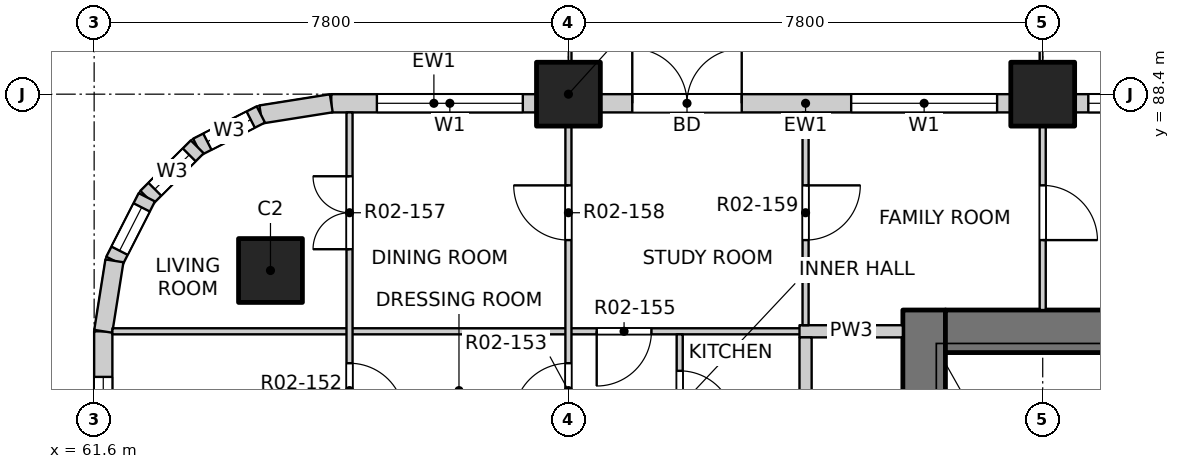
"""IFC4 building model, lengths in metres.
Left out: names, types, materials, properties, quantities, classifications, styles, units other than length and angle.
Written with IfcOpenShell. Run it as: python <this file> out.ifc"""

import sys

from ifc_helpers import new_model, si_unit, direction, frame, frame_2d, origin, origin_2d, place, context, subcontext, project, spatial, rectangle, extrude, element, fill, save


model = new_model("IFC4")
c1 = context("Model", 3, precision=1e-05, world=origin(), true_north=direction((0.0, 1.0)))
c2 = subcontext(c1, "Body", "Model", "MODEL_VIEW")
j1 = project(units=[si_unit("LENGTHUNIT", "METRE"), si_unit("PLANEANGLEUNIT", "RADIAN")], contexts=[c1])
p1 = place(None, origin())
s1 = spatial("IfcSite", under=j1, at=p1, CompositionType="ELEMENT")
p2 = place(p1, origin())
s2 = spatial("IfcBuilding", under=s1, at=p2, CompositionType="ELEMENT")
p3 = place(p2, frame((0.0, 0.0, 29.7)))
s3 = spatial("IfcBuildingStorey", under=s2, at=p3, CompositionType="ELEMENT", Elevation=29.7)
for number, where, z_axis, x_axis in (
    (1, (64.5, 85.5, -0.25), (0.0, 0.0, 1.0), (1.0, 0.0, 0.0)),
    (2, (69.4, 88.4, -0.25), (0.0, 0.0, 1.0), (1.0, 0.0, 0.0)),
    (3, (77.2, 88.4, -0.25), (0.0, 0.0, 1.0), (1.0, 0.0, 0.0)),
):
    element("IfcColumn", number, at=place(p3, frame(where, z_axis=z_axis, x_axis=x_axis)), inside=s3, PredefinedType="COLUMN", context=c2, shape_type="SweptSolid", body=[
        extrude(rectangle(XDim=1.05, YDim=1.05, at=origin_2d()), origin(), (0.0, 0.0, 1.0), 3.4),
    ])
p4 = place(p3, frame((75.25, 77.3, -0.25), z_axis=(0.0, 0.0, 1.0), x_axis=(0.0, 1.0, 0.0)))
e4 = element("IfcWall", 4, at=p4, inside=s3, PredefinedType="SOLIDWALL", context=c2, shape_type="SweptSolid", body=[
    extrude(rectangle(XDim=7.55, YDim=0.7, at=frame_2d((3.775, 0.0))), origin(), (0.0, 0.0, 1.0), 3.4),
])
p5 = place(p4, frame((0.3, 0.0, 0.25)))
e5 = element("IfcOpeningElement", 5, at=p5, cuts=e4, PredefinedType="OPENING", context=c2, shape_type="SweptSolid", body=[
    extrude(rectangle(XDim=1.2, YDim=2.1, at=frame_2d((0.6, 1.05))), frame((0.0, 0.36, 0.0), z_axis=(0.0, -1.0, 0.0), x_axis=(1.0, 0.0, 0.0)), (0.0, 0.0, 1.0), 0.72),
])
p6 = place(p3, frame((75.6, 84.5, -0.25), z_axis=(0.0, 0.0, 1.0), x_axis=(1.0, 0.0, 0.0)))
e6 = element("IfcWall", 6, at=p6, inside=s3, PredefinedType="SOLIDWALL", context=c2, shape_type="SweptSolid", body=[
    extrude(rectangle(XDim=18.8, YDim=0.7, at=frame_2d((9.4, 0.0))), origin(), (0.0, 0.0, 1.0), 3.4),
])
p7 = place(p3, frame((65.5, 88.25, 0.0), z_axis=(0.0, 0.0, 1.0), x_axis=(1.0, 0.0, 0.0)))
e7 = element("IfcWall", 7, at=p7, inside=s3, PredefinedType="SOLIDWALL", context=c2, shape_type="SweptSolid", body=[
    extrude(rectangle(XDim=3.375, YDim=0.3, at=frame_2d((1.688, 0.0))), origin(), (0.0, 0.0, 1.0), 2.7),
])
p8 = place(p7, frame((0.75, 0.0, 0.9)))
e8 = element("IfcOpeningElement", 8, at=p8, cuts=e7, PredefinedType="OPENING", context=c2, shape_type="SweptSolid", body=[
    extrude(rectangle(XDim=2.4, YDim=1.8, at=frame_2d((1.2, 0.9))), frame((0.0, 0.16, 0.0), z_axis=(0.0, -1.0, 0.0), x_axis=(1.0, 0.0, 0.0)), (0.0, 0.0, 1.0), 0.32),
])
p9 = place(p3, frame((69.925, 88.25, 0.0), z_axis=(0.0, 0.0, 1.0), x_axis=(1.0, 0.0, 0.0)))
e9 = element("IfcWall", 9, at=p9, inside=s3, PredefinedType="SOLIDWALL", context=c2, shape_type="SweptSolid", body=[
    extrude(rectangle(XDim=6.75, YDim=0.3, at=frame_2d((3.375, 0.0))), origin(), (0.0, 0.0, 1.0), 2.7),
])
p10 = place(p9, frame((0.525, 0.0, 0.0)))
e10 = element("IfcOpeningElement", 10, at=p10, cuts=e9, PredefinedType="OPENING", context=c2, shape_type="SweptSolid", body=[
    extrude(rectangle(XDim=1.8, YDim=2.4, at=frame_2d((0.9, 1.2))), frame((0.0, 0.16, 0.0), z_axis=(0.0, -1.0, 0.0), x_axis=(1.0, 0.0, 0.0)), (0.0, 0.0, 1.0), 0.32),
])
p11 = place(p9, frame((4.125, 0.0, 0.9)))
e11 = element("IfcOpeningElement", 11, at=p11, cuts=e9, PredefinedType="OPENING", context=c2, shape_type="SweptSolid", body=[
    extrude(rectangle(XDim=2.4, YDim=1.8, at=frame_2d((1.2, 0.9))), frame((0.0, 0.16, 0.0), z_axis=(0.0, -1.0, 0.0), x_axis=(1.0, 0.0, 0.0)), (0.0, 0.0, 1.0), 0.32),
])
p12 = place(p3, frame((77.725, 88.25, 0.0), z_axis=(0.0, 0.0, 1.0), x_axis=(1.0, 0.0, 0.0)))
e12 = element("IfcWall", 12, at=p12, inside=s3, PredefinedType="SOLIDWALL", context=c2, shape_type="SweptSolid", body=[
    extrude(rectangle(XDim=6.75, YDim=0.3, at=frame_2d((3.375, 0.0))), origin(), (0.0, 0.0, 1.0), 2.7),
])
p13 = place(p12, frame((0.225, 0.0, 0.9)))
e13 = element("IfcOpeningElement", 13, at=p13, cuts=e12, PredefinedType="OPENING", context=c2, shape_type="SweptSolid", body=[
    extrude(rectangle(XDim=2.4, YDim=1.8, at=frame_2d((1.2, 0.9))), frame((0.0, 0.16, 0.0), z_axis=(0.0, -1.0, 0.0), x_axis=(1.0, 0.0, 0.0)), (0.0, 0.0, 1.0), 0.32),
])
p14 = place(p12, frame((4.125, 0.0, 0.9)))
e14 = element("IfcOpeningElement", 14, at=p14, cuts=e12, PredefinedType="OPENING", context=c2, shape_type="SweptSolid", body=[
    extrude(rectangle(XDim=2.4, YDim=1.8, at=frame_2d((1.2, 0.9))), frame((0.0, 0.16, 0.0), z_axis=(0.0, -1.0, 0.0), x_axis=(1.0, 0.0, 0.0)), (0.0, 0.0, 1.0), 0.32),
])
p15 = place(p3, frame((61.75, 81.125, 0.0), z_axis=(0.0, 0.0, 1.0), x_axis=(0.0, 1.0, 0.0)))
e15 = element("IfcWall", 15, at=p15, inside=s3, PredefinedType="SOLIDWALL", context=c2, shape_type="SweptSolid", body=[
    extrude(rectangle(XDim=3.375, YDim=0.3, at=frame_2d((1.688, 0.0))), origin(), (0.0, 0.0, 1.0), 2.7),
])
p16 = place(p15, frame((0.225, 0.0, 0.9)))
e16 = element("IfcOpeningElement", 16, at=p16, cuts=e15, PredefinedType="OPENING", context=c2, shape_type="SweptSolid", body=[
    extrude(rectangle(XDim=2.4, YDim=1.8, at=frame_2d((1.2, 0.9))), frame((0.0, 0.16, 0.0), z_axis=(0.0, -1.0, 0.0), x_axis=(1.0, 0.0, 0.0)), (0.0, 0.0, 1.0), 0.32),
])
p17 = place(p3, frame((65.5, 88.25, 0.0), z_axis=(0.0, 0.0, 1.0), x_axis=(-0.987678452879, -0.156496880861, 0.0)))
e17 = element("IfcWall", 17, at=p17, inside=s3, PredefinedType="SOLIDWALL", context=c2, shape_type="SweptSolid", body=[
    extrude(rectangle(XDim=1.173, YDim=0.3, at=frame_2d((0.586, 0.0))), origin(), (0.0, 0.0, 1.0), 2.7),
])
p18 = place(p3, frame((64.341, 88.066, 0.0), z_axis=(0.0, 0.0, 1.0), x_axis=(-0.890988677504, -0.454025524128, 0.0)))
e18 = element("IfcWall", 18, at=p18, inside=s3, PredefinedType="SOLIDWALL", context=c2, shape_type="SweptSolid", body=[
    extrude(rectangle(XDim=1.173, YDim=0.3, at=frame_2d((0.587, 0.0))), origin(), (0.0, 0.0, 1.0), 2.7),
])
p19 = place(p18, frame((0.187, 0.0, 0.9)))
e19 = element("IfcOpeningElement", 19, at=p19, cuts=e18, PredefinedType="OPENING", context=c2, shape_type="SweptSolid", body=[
    extrude(rectangle(XDim=0.8, YDim=1.2, at=frame_2d((0.4, 0.6))), frame((0.0, 0.16, 0.0), z_axis=(0.0, -1.0, 0.0), x_axis=(1.0, 0.0, 0.0)), (0.0, 0.0, 1.0), 0.32),
])
p20 = place(p3, frame((63.296, 87.534, 0.0), z_axis=(0.0, 0.0, 1.0), x_axis=(-0.707106781187, -0.707106781187, 0.0)))
e20 = element("IfcWall", 20, at=p20, inside=s3, PredefinedType="SOLIDWALL", context=c2, shape_type="SweptSolid", body=[
    extrude(rectangle(XDim=1.173, YDim=0.3, at=frame_2d((0.586, 0.0))), origin(), (0.0, 0.0, 1.0), 2.7),
])
p21 = place(p20, frame((0.187, 0.0, 0.9)))
e21 = element("IfcOpeningElement", 21, at=p21, cuts=e20, PredefinedType="OPENING", context=c2, shape_type="SweptSolid", body=[
    extrude(rectangle(XDim=0.8, YDim=1.2, at=frame_2d((0.4, 0.6))), frame((0.0, 0.16, 0.0), z_axis=(0.0, -1.0, 0.0), x_axis=(1.0, 0.0, 0.0)), (0.0, 0.0, 1.0), 0.32),
])
p22 = place(p3, frame((62.466, 86.704, 0.0), z_axis=(0.0, 0.0, 1.0), x_axis=(-0.454025524128, -0.890988677504, 0.0)))
e22 = element("IfcWall", 22, at=p22, inside=s3, PredefinedType="SOLIDWALL", context=c2, shape_type="SweptSolid", body=[
    extrude(rectangle(XDim=1.173, YDim=0.3, at=frame_2d((0.587, 0.0))), origin(), (0.0, 0.0, 1.0), 2.7),
])
p23 = place(p22, frame((0.187, 0.0, 0.9)))
e23 = element("IfcOpeningElement", 23, at=p23, cuts=e22, PredefinedType="OPENING", context=c2, shape_type="SweptSolid", body=[
    extrude(rectangle(XDim=0.8, YDim=1.2, at=frame_2d((0.4, 0.6))), frame((0.0, 0.16, 0.0), z_axis=(0.0, -1.0, 0.0), x_axis=(1.0, 0.0, 0.0)), (0.0, 0.0, 1.0), 0.32),
])
p24 = place(p3, frame((61.934, 85.659, 0.0), z_axis=(0.0, 0.0, 1.0), x_axis=(-0.156496880861, -0.987678452879, 0.0)))
e24 = element("IfcWall", 24, at=p24, inside=s3, PredefinedType="SOLIDWALL", context=c2, shape_type="SweptSolid", body=[
    extrude(rectangle(XDim=1.173, YDim=0.3, at=frame_2d((0.586, 0.0))), origin(), (0.0, 0.0, 1.0), 2.7),
])
p25 = place(p3, frame((61.9, 84.5, 0.0), z_axis=(0.0, 0.0, 1.0), x_axis=(1.0, 0.0, 0.0)))
e25 = element("IfcWall", 25, at=p25, inside=s3, PredefinedType="PARTITIONING", context=c2, shape_type="SweptSolid", body=[
    extrude(rectangle(XDim=11.5, YDim=0.1, at=frame_2d((5.75, 0.0))), origin(), (0.0, 0.0, 1.0), 3.15),
])
p26 = place(p25, frame((7.965, 0.0, 0.0)))
e26 = element("IfcOpeningElement", 26, at=p26, cuts=e25, PredefinedType="OPENING", context=c2, shape_type="SweptSolid", body=[
    extrude(rectangle(XDim=0.9, YDim=2.1, at=frame_2d((0.45, 1.05))), frame((0.0, 0.06, 0.0), z_axis=(0.0, -1.0, 0.0), x_axis=(1.0, 0.0, 0.0)), (0.0, 0.0, 1.0), 0.12),
])
p27 = place(p3, frame((73.2, 84.5, 0.0), z_axis=(0.0, 0.0, 1.0), x_axis=(1.0, 0.0, 0.0)))
e27 = element("IfcWall", 27, at=p27, inside=s3, PredefinedType="PARTITIONING", context=c2, shape_type="SweptSolid", body=[
    extrude(rectangle(XDim=1.7, YDim=0.2, at=frame_2d((0.85, 0.0))), origin(), (0.0, 0.0, 1.0), 3.15),
])
p28 = place(p3, frame((65.8, 76.8, 0.0), z_axis=(0.0, 0.0, 1.0), x_axis=(0.0, 1.0, 0.0)))
e28 = element("IfcWall", 28, at=p28, inside=s3, PredefinedType="PARTITIONING", context=c2, shape_type="SweptSolid", body=[
    extrude(rectangle(XDim=11.3, YDim=0.1, at=frame_2d((5.65, 0.0))), origin(), (0.0, 0.0, 1.0), 3.15),
])
p29 = place(p28, frame((0.425, 0.0, 0.0)))
e29 = element("IfcOpeningElement", 29, at=p29, cuts=e28, PredefinedType="OPENING", context=c2, shape_type="SweptSolid", body=[
    extrude(rectangle(XDim=0.9, YDim=2.1, at=frame_2d((0.45, 1.05))), frame((0.0, 0.06, 0.0), z_axis=(0.0, -1.0, 0.0), x_axis=(1.0, 0.0, 0.0)), (0.0, 0.0, 1.0), 0.12),
])
p30 = place(p28, frame((2.375, 0.0, 0.0)))
e30 = element("IfcOpeningElement", 30, at=p30, cuts=e28, PredefinedType="OPENING", context=c2, shape_type="SweptSolid", body=[
    extrude(rectangle(XDim=0.9, YDim=2.1, at=frame_2d((0.45, 1.05))), frame((0.0, 0.06, 0.0), z_axis=(0.0, -1.0, 0.0), x_axis=(1.0, 0.0, 0.0)), (0.0, 0.0, 1.0), 0.12),
])
p31 = place(p28, frame((4.325, 0.0, 0.0)))
e31 = element("IfcOpeningElement", 31, at=p31, cuts=e28, PredefinedType="OPENING", context=c2, shape_type="SweptSolid", body=[
    extrude(rectangle(XDim=0.9, YDim=2.1, at=frame_2d((0.45, 1.05))), frame((0.0, 0.06, 0.0), z_axis=(0.0, -1.0, 0.0), x_axis=(1.0, 0.0, 0.0)), (0.0, 0.0, 1.0), 0.12),
])
p32 = place(p28, frame((6.275, 0.0, 0.0)))
e32 = element("IfcOpeningElement", 32, at=p32, cuts=e28, PredefinedType="OPENING", context=c2, shape_type="SweptSolid", body=[
    extrude(rectangle(XDim=0.9, YDim=2.1, at=frame_2d((0.45, 1.05))), frame((0.0, 0.06, 0.0), z_axis=(0.0, -1.0, 0.0), x_axis=(1.0, 0.0, 0.0)), (0.0, 0.0, 1.0), 0.12),
])
p33 = place(p28, frame((9.05, 0.0, 0.0)))
e33 = element("IfcOpeningElement", 33, at=p33, cuts=e28, PredefinedType="OPENING", context=c2, shape_type="SweptSolid", body=[
    extrude(rectangle(XDim=1.2, YDim=2.1, at=frame_2d((0.6, 1.05))), frame((0.0, 0.06, 0.0), z_axis=(0.0, -1.0, 0.0), x_axis=(1.0, 0.0, 0.0)), (0.0, 0.0, 1.0), 0.12),
])
p34 = place(p3, frame((69.4, 80.6, 0.0), z_axis=(0.0, 0.0, 1.0), x_axis=(0.0, 1.0, 0.0)))
e34 = element("IfcWall", 34, at=p34, inside=s3, PredefinedType="PARTITIONING", context=c2, shape_type="SweptSolid", body=[
    extrude(rectangle(XDim=7.5, YDim=0.1, at=frame_2d((3.75, 0.0))), origin(), (0.0, 0.0, 1.0), 2.55),
])
p35 = place(p34, frame((2.475, 0.0, 0.0)))
e35 = element("IfcOpeningElement", 35, at=p35, cuts=e34, PredefinedType="OPENING", context=c2, shape_type="SweptSolid", body=[
    extrude(rectangle(XDim=0.9, YDim=2.1, at=frame_2d((0.45, 1.05))), frame((0.0, 0.06, 0.0), z_axis=(0.0, -1.0, 0.0), x_axis=(1.0, 0.0, 0.0)), (0.0, 0.0, 1.0), 0.12),
])
p36 = place(p34, frame((5.4, 0.0, 0.0)))
e36 = element("IfcOpeningElement", 36, at=p36, cuts=e34, PredefinedType="OPENING", context=c2, shape_type="SweptSolid", body=[
    extrude(rectangle(XDim=0.9, YDim=2.1, at=frame_2d((0.45, 1.05))), frame((0.0, 0.06, 0.0), z_axis=(0.0, -1.0, 0.0), x_axis=(1.0, 0.0, 0.0)), (0.0, 0.0, 1.0), 0.12),
])
p37 = place(p3, frame((71.23, 79.3, 0.0), z_axis=(0.0, 0.0, 1.0), x_axis=(0.0, 1.0, 0.0)))
e37 = element("IfcWall", 37, at=p37, inside=s3, PredefinedType="PARTITIONING", context=c2, shape_type="SweptSolid", body=[
    extrude(rectangle(XDim=5.15, YDim=0.1, at=frame_2d((2.575, 0.0))), origin(), (0.0, 0.0, 1.0), 3.15),
])
p38 = place(p37, frame((0.325, 0.0, 0.0)))
e38 = element("IfcOpeningElement", 38, at=p38, cuts=e37, PredefinedType="OPENING", context=c2, shape_type="SweptSolid", body=[
    extrude(rectangle(XDim=0.8, YDim=2.1, at=frame_2d((0.4, 1.05))), frame((0.0, 0.06, 0.0), z_axis=(0.0, -1.0, 0.0), x_axis=(1.0, 0.0, 0.0)), (0.0, 0.0, 1.0), 0.12),
])
p39 = place(p37, frame((1.8, 0.0, 0.0)))
e39 = element("IfcOpeningElement", 39, at=p39, cuts=e37, PredefinedType="OPENING", context=c2, shape_type="SweptSolid", body=[
    extrude(rectangle(XDim=0.9, YDim=2.1, at=frame_2d((0.45, 1.05))), frame((0.0, 0.06, 0.0), z_axis=(0.0, -1.0, 0.0), x_axis=(1.0, 0.0, 0.0)), (0.0, 0.0, 1.0), 0.12),
])
p40 = place(p37, frame((3.65, 0.0, 0.0)))
e40 = element("IfcOpeningElement", 40, at=p40, cuts=e37, PredefinedType="OPENING", context=c2, shape_type="SweptSolid", body=[
    extrude(rectangle(XDim=0.9, YDim=2.1, at=frame_2d((0.45, 1.05))), frame((0.0, 0.06, 0.0), z_axis=(0.0, -1.0, 0.0), x_axis=(1.0, 0.0, 0.0)), (0.0, 0.0, 1.0), 0.12),
])
p41 = place(p3, frame((73.3, 53.4, 0.0), z_axis=(0.0, 0.0, 1.0), x_axis=(0.0, 1.0, 0.0)))
e41 = element("IfcWall", 41, at=p41, inside=s3, PredefinedType="PARTITIONING", context=c2, shape_type="SweptSolid", body=[
    extrude(rectangle(XDim=31.0, YDim=0.2, at=frame_2d((15.5, 0.0))), origin(), (0.0, 0.0, 1.0), 3.15),
])
p42 = place(p41, frame((2.675, 0.0, 0.0)))
e42 = element("IfcOpeningElement", 42, at=p42, cuts=e41, PredefinedType="OPENING", context=c2, shape_type="SweptSolid", body=[
    extrude(rectangle(XDim=1.0, YDim=2.1, at=frame_2d((0.5, 1.05))), frame((0.0, 0.11, 0.0), z_axis=(0.0, -1.0, 0.0), x_axis=(1.0, 0.0, 0.0)), (0.0, 0.0, 1.0), 0.22),
])
p43 = place(p41, frame((18.125, 0.0, 0.0)))
e43 = element("IfcOpeningElement", 43, at=p43, cuts=e41, PredefinedType="OPENING", context=c2, shape_type="SweptSolid", body=[
    extrude(rectangle(XDim=1.0, YDim=2.1, at=frame_2d((0.5, 1.05))), frame((0.0, 0.11, 0.0), z_axis=(0.0, -1.0, 0.0), x_axis=(1.0, 0.0, 0.0)), (0.0, 0.0, 1.0), 0.22),
])
p44 = place(p41, frame((26.025, 0.0, 0.0)))
e44 = element("IfcOpeningElement", 44, at=p44, cuts=e41, PredefinedType="OPENING", context=c2, shape_type="SweptSolid", body=[
    extrude(rectangle(XDim=1.0, YDim=2.1, at=frame_2d((0.5, 1.05))), frame((0.0, 0.11, 0.0), z_axis=(0.0, -1.0, 0.0), x_axis=(1.0, 0.0, 0.0)), (0.0, 0.0, 1.0), 0.22),
])
p45 = place(p3, frame((73.3, 84.6, 0.0), z_axis=(0.0, 0.0, 1.0), x_axis=(0.0, 1.0, 0.0)))
e45 = element("IfcWall", 45, at=p45, inside=s3, PredefinedType="PARTITIONING", context=c2, shape_type="SweptSolid", body=[
    extrude(rectangle(XDim=3.5, YDim=0.1, at=frame_2d((1.75, 0.0))), origin(), (0.0, 0.0, 1.0), 3.15),
])
p46 = place(p45, frame((1.4, 0.0, 0.0)))
e46 = element("IfcOpeningElement", 46, at=p46, cuts=e45, PredefinedType="OPENING", context=c2, shape_type="SweptSolid", body=[
    extrude(rectangle(XDim=0.9, YDim=2.1, at=frame_2d((0.45, 1.05))), frame((0.0, 0.06, 0.0), z_axis=(0.0, -1.0, 0.0), x_axis=(1.0, 0.0, 0.0)), (0.0, 0.0, 1.0), 0.12),
])
p47 = place(p3, frame((77.2, 84.85, 0.0), z_axis=(0.0, 0.0, 1.0), x_axis=(0.0, 1.0, 0.0)))
e47 = element("IfcWall", 47, at=p47, inside=s3, PredefinedType="PARTITIONING", context=c2, shape_type="SweptSolid", body=[
    extrude(rectangle(XDim=3.25, YDim=0.1, at=frame_2d((1.625, 0.0))), origin(), (0.0, 0.0, 1.0), 3.15),
])
p48 = place(p47, frame((1.15, 0.0, 0.0)))
e48 = element("IfcOpeningElement", 48, at=p48, cuts=e47, PredefinedType="OPENING", context=c2, shape_type="SweptSolid", body=[
    extrude(rectangle(XDim=0.9, YDim=2.1, at=frame_2d((0.45, 1.05))), frame((0.0, 0.06, 0.0), z_axis=(0.0, -1.0, 0.0), x_axis=(1.0, 0.0, 0.0)), (0.0, 0.0, 1.0), 0.12),
])
p49 = place(p8, origin())
e49 = element("IfcWindow", 49, at=p49, inside=s3, PartitioningType="DOUBLE_PANEL_VERTICAL", PredefinedType="WINDOW", context=c2, shape_type="SweptSolid", body=[
    extrude(rectangle(XDim=2.4, YDim=1.8, at=frame_2d((1.2, 0.9))), frame((0.0, 0.03, 0.0), z_axis=(0.0, -1.0, 0.0), x_axis=(1.0, 0.0, 0.0)), (0.0, 0.0, 1.0), 0.06),
])
fill(e8, e49)
p50 = place(p10, origin())
e50 = element("IfcDoor", 50, at=p50, inside=s3, OperationType="DOUBLE_DOOR_SINGLE_SWING", PredefinedType="DOOR", context=c2, shape_type="SweptSolid", body=[
    extrude(rectangle(XDim=1.8, YDim=2.4, at=frame_2d((0.9, 1.2))), frame((0.0, 0.025, 0.0), z_axis=(0.0, -1.0, 0.0), x_axis=(1.0, 0.0, 0.0)), (0.0, 0.0, 1.0), 0.05),
])
fill(e10, e50)
p51 = place(p11, origin())
e51 = element("IfcWindow", 51, at=p51, inside=s3, PartitioningType="DOUBLE_PANEL_VERTICAL", PredefinedType="WINDOW", context=c2, shape_type="SweptSolid", body=[
    extrude(rectangle(XDim=2.4, YDim=1.8, at=frame_2d((1.2, 0.9))), frame((0.0, 0.03, 0.0), z_axis=(0.0, -1.0, 0.0), x_axis=(1.0, 0.0, 0.0)), (0.0, 0.0, 1.0), 0.06),
])
fill(e11, e51)
p52 = place(p13, origin())
e52 = element("IfcWindow", 52, at=p52, inside=s3, PartitioningType="DOUBLE_PANEL_VERTICAL", PredefinedType="WINDOW", context=c2, shape_type="SweptSolid", body=[
    extrude(rectangle(XDim=2.4, YDim=1.8, at=frame_2d((1.2, 0.9))), frame((0.0, 0.03, 0.0), z_axis=(0.0, -1.0, 0.0), x_axis=(1.0, 0.0, 0.0)), (0.0, 0.0, 1.0), 0.06),
])
fill(e13, e52)
p53 = place(p16, origin())
e53 = element("IfcWindow", 53, at=p53, inside=s3, PartitioningType="DOUBLE_PANEL_VERTICAL", PredefinedType="WINDOW", context=c2, shape_type="SweptSolid", body=[
    extrude(rectangle(XDim=2.4, YDim=1.8, at=frame_2d((1.2, 0.9))), frame((0.0, 0.03, 0.0), z_axis=(0.0, -1.0, 0.0), x_axis=(1.0, 0.0, 0.0)), (0.0, 0.0, 1.0), 0.06),
])
fill(e16, e53)
p54 = place(p19, origin())
e54 = element("IfcWindow", 54, at=p54, inside=s3, PartitioningType="SINGLE_PANEL", PredefinedType="WINDOW", context=c2, shape_type="SweptSolid", body=[
    extrude(rectangle(XDim=0.8, YDim=1.2, at=frame_2d((0.4, 0.6))), frame((0.0, 0.03, 0.0), z_axis=(0.0, -1.0, 0.0), x_axis=(1.0, 0.0, 0.0)), (0.0, 0.0, 1.0), 0.06),
])
fill(e19, e54)
p55 = place(p21, origin())
e55 = element("IfcWindow", 55, at=p55, inside=s3, PartitioningType="SINGLE_PANEL", PredefinedType="WINDOW", context=c2, shape_type="SweptSolid", body=[
    extrude(rectangle(XDim=0.8, YDim=1.2, at=frame_2d((0.4, 0.6))), frame((0.0, 0.03, 0.0), z_axis=(0.0, -1.0, 0.0), x_axis=(1.0, 0.0, 0.0)), (0.0, 0.0, 1.0), 0.06),
])
fill(e21, e55)
p56 = place(p23, origin())
e56 = element("IfcWindow", 56, at=p56, inside=s3, PartitioningType="SINGLE_PANEL", PredefinedType="WINDOW", context=c2, shape_type="SweptSolid", body=[
    extrude(rectangle(XDim=0.8, YDim=1.2, at=frame_2d((0.4, 0.6))), frame((0.0, 0.03, 0.0), z_axis=(0.0, -1.0, 0.0), x_axis=(1.0, 0.0, 0.0)), (0.0, 0.0, 1.0), 0.06),
])
fill(e23, e56)
p57 = place(p40, origin())
e57 = element("IfcDoor", 57, at=p57, inside=s3, OperationType="SINGLE_SWING_RIGHT", PredefinedType="DOOR", context=c2, shape_type="SweptSolid", body=[
    extrude(rectangle(XDim=0.9, YDim=2.1, at=frame_2d((0.45, 1.05))), frame((0.0, 0.025, 0.0), z_axis=(0.0, -1.0, 0.0), x_axis=(1.0, 0.0, 0.0)), (0.0, 0.0, 1.0), 0.05),
])
fill(e40, e57)
p58 = place(p32, origin())
e58 = element("IfcDoor", 58, at=p58, inside=s3, OperationType="SINGLE_SWING_RIGHT", PredefinedType="DOOR", context=c2, shape_type="SweptSolid", body=[
    extrude(rectangle(XDim=0.9, YDim=2.1, at=frame_2d((0.45, 1.05))), frame((0.0, 0.025, 0.0), z_axis=(0.0, -1.0, 0.0), x_axis=(1.0, 0.0, 0.0)), (0.0, 0.0, 1.0), 0.05),
])
fill(e32, e58)
p59 = place(p35, origin())
e59 = element("IfcDoor", 59, at=p59, inside=s3, OperationType="SINGLE_SWING_LEFT", PredefinedType="DOOR", context=c2, shape_type="SweptSolid", body=[
    extrude(rectangle(XDim=0.9, YDim=2.1, at=frame_2d((0.45, 1.05))), frame((0.0, 0.025, 0.0), z_axis=(0.0, -1.0, 0.0), x_axis=(1.0, 0.0, 0.0)), (0.0, 0.0, 1.0), 0.05),
])
fill(e35, e59)
p60 = place(p26, origin())
e60 = element("IfcDoor", 60, at=p60, inside=s3, OperationType="SINGLE_SWING_RIGHT", PredefinedType="DOOR", context=c2, shape_type="SweptSolid", body=[
    extrude(rectangle(XDim=0.9, YDim=2.1, at=frame_2d((0.45, 1.05))), frame((0.0, 0.025, 0.0), z_axis=(0.0, -1.0, 0.0), x_axis=(1.0, 0.0, 0.0)), (0.0, 0.0, 1.0), 0.05),
])
fill(e26, e60)
p61 = place(p33, origin())
e61 = element("IfcDoor", 61, at=p61, inside=s3, OperationType="DOUBLE_DOOR_SINGLE_SWING", PredefinedType="DOOR", context=c2, shape_type="SweptSolid", body=[
    extrude(rectangle(XDim=1.2, YDim=2.1, at=frame_2d((0.6, 1.05))), frame((0.0, 0.025, 0.0), z_axis=(0.0, -1.0, 0.0), x_axis=(1.0, 0.0, 0.0)), (0.0, 0.0, 1.0), 0.05),
])
fill(e33, e61)
p62 = place(p36, origin())
e62 = element("IfcDoor", 62, at=p62, inside=s3, OperationType="SINGLE_SWING_RIGHT", PredefinedType="DOOR", context=c2, shape_type="SweptSolid", body=[
    extrude(rectangle(XDim=0.9, YDim=2.1, at=frame_2d((0.45, 1.05))), frame((0.0, 0.025, 0.0), z_axis=(0.0, -1.0, 0.0), x_axis=(1.0, 0.0, 0.0)), (0.0, 0.0, 1.0), 0.05),
])
fill(e36, e62)
p63 = place(p46, origin())
e63 = element("IfcDoor", 63, at=p63, inside=s3, OperationType="SINGLE_SWING_LEFT", PredefinedType="DOOR", context=c2, shape_type="SweptSolid", body=[
    extrude(rectangle(XDim=0.9, YDim=2.1, at=frame_2d((0.45, 1.05))), frame((0.0, 0.025, 0.0), z_axis=(0.0, -1.0, 0.0), x_axis=(1.0, 0.0, 0.0)), (0.0, 0.0, 1.0), 0.05),
])
fill(e46, e63)
p64 = place(p48, origin())
e64 = element("IfcDoor", 64, at=p64, inside=s3, OperationType="SINGLE_SWING_RIGHT", PredefinedType="DOOR", context=c2, shape_type="SweptSolid", body=[
    extrude(rectangle(XDim=0.9, YDim=2.1, at=frame_2d((0.45, 1.05))), frame((0.0, 0.025, 0.0), z_axis=(0.0, -1.0, 0.0), x_axis=(1.0, 0.0, 0.0)), (0.0, 0.0, 1.0), 0.05),
])
fill(e48, e64)
save(model, sys.argv[1])
